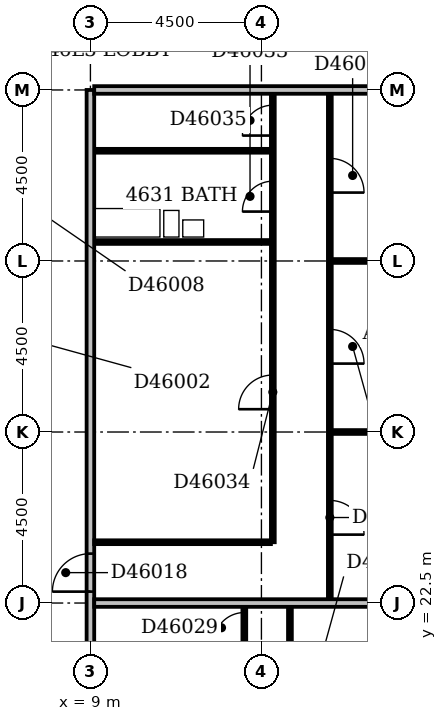
"""IFC4 building model, lengths in metres.
Left out: names, types, materials, properties, quantities, classifications, styles, units other than length and angle.
Written with IfcOpenShell. Run it as: python <this file> out.ifc"""

import sys

from ifc_helpers import new_model, si_unit, direction, frame, frame_2d, origin, place, context, subcontext, project, spatial, rectangle, extrude, element, fill, save


model = new_model("IFC4")
c1 = context("Model", 3, precision=1e-05, world=origin(), true_north=direction((0.0, 1.0)))
c2 = subcontext(c1, "Body", "Model", "MODEL_VIEW")
j1 = project(units=[si_unit("LENGTHUNIT", "METRE"), si_unit("PLANEANGLEUNIT", "RADIAN")], contexts=[c1])
p1 = place(None, origin())
s1 = spatial("IfcSite", under=j1, at=p1, CompositionType="ELEMENT")
p2 = place(p1, origin())
s2 = spatial("IfcBuilding", under=s1, at=p2, CompositionType="ELEMENT")
p3 = place(p2, frame((0.0, 0.0, 182.6)))
s3 = spatial("IfcBuildingStorey", under=s2, at=p3, CompositionType="ELEMENT", Elevation=182.6)
p4 = place(p3, frame((9.0, 5.0, 0.0), z_axis=(0.0, 0.0, 1.0), x_axis=(0.0, 1.0, 0.0)))
e1 = element("IfcWall", 1, at=p4, inside=s3, PredefinedType="PARTITIONING", context=c2, shape_type="SweptSolid", body=[
    extrude(rectangle(XDim=31.0, YDim=0.2, at=frame_2d((15.5, 0.0))), origin(), (0.0, 0.0, 1.0), 3.25),
])
p5 = place(p4, frame((17.8, 0.0, 0.0)))
e2 = element("IfcOpeningElement", 2, at=p5, cuts=e1, PredefinedType="OPENING", context=c2, shape_type="SweptSolid", body=[
    extrude(rectangle(XDim=1.0, YDim=2.1, at=frame_2d((0.5, 1.05))), frame((0.0, 0.112, 0.0), z_axis=(0.0, -1.0, 0.0), x_axis=(1.0, 0.0, 0.0)), (0.0, 0.0, 1.0), 0.224),
])
p6 = place(p4, frame((14.95, 0.0, 0.0)))
e3 = element("IfcOpeningElement", 3, at=p6, cuts=e1, PredefinedType="OPENING", context=c2, shape_type="SweptSolid", body=[
    extrude(rectangle(XDim=1.0, YDim=2.1, at=frame_2d((0.5, 1.05))), frame((0.0, 0.112, 0.0), z_axis=(0.0, -1.0, 0.0), x_axis=(1.0, 0.0, 0.0)), (0.0, 0.0, 1.0), 0.224),
])
p7 = place(p4, frame((9.3, 0.0, 0.0)))
e4 = element("IfcOpeningElement", 4, at=p7, cuts=e1, PredefinedType="OPENING", context=c2, shape_type="SweptSolid", body=[
    extrude(rectangle(XDim=1.0, YDim=2.1, at=frame_2d((0.5, 1.05))), frame((0.0, 0.112, 0.0), z_axis=(0.0, -1.0, 0.0), x_axis=(1.0, 0.0, 0.0)), (0.0, 0.0, 1.0), 0.224),
])
p8 = place(p4, frame((1.5, 0.0, 0.0)))
e5 = element("IfcOpeningElement", 5, at=p8, cuts=e1, PredefinedType="OPENING", context=c2, shape_type="SweptSolid", body=[
    extrude(rectangle(XDim=0.9, YDim=2.1, at=frame_2d((0.45, 1.05))), frame((0.0, 0.112, 0.0), z_axis=(0.0, -1.0, 0.0), x_axis=(1.0, 0.0, 0.0)), (0.0, 0.0, 1.0), 0.224),
])
p9 = place(p3, frame((14.25, 18.1, 0.0), z_axis=(0.0, 0.0, 1.0), x_axis=(0.0, 1.0, 0.0)))
e6 = element("IfcWall", 6, at=p9, inside=s3, PredefinedType="PARTITIONING", context=c2, shape_type="SweptSolid", body=[
    extrude(rectangle(XDim=4.3, YDim=0.1, at=frame_2d((2.15, 0.0))), origin(), (0.0, 0.0, 1.0), 3.25),
])
p10 = place(p9, frame((1.7, 0.0, 0.0)))
e7 = element("IfcOpeningElement", 7, at=p10, cuts=e6, PredefinedType="OPENING", context=c2, shape_type="SweptSolid", body=[
    extrude(rectangle(XDim=0.9, YDim=2.1, at=frame_2d((0.45, 1.05))), frame((0.0, 0.062, 0.0), z_axis=(0.0, -1.0, 0.0), x_axis=(1.0, 0.0, 0.0)), (0.0, 0.0, 1.0), 0.124),
])
p11 = place(p3, frame((13.05, 21.2, 0.0), z_axis=(0.0, 0.0, 1.0), x_axis=(0.0, 1.0, 0.0)))
e8 = element("IfcWall", 8, at=p11, inside=s3, PredefinedType="PARTITIONING", context=c2, shape_type="SweptSolid", body=[
    extrude(rectangle(XDim=1.2, YDim=0.1, at=frame_2d((0.6, 0.0))), origin(), (0.0, 0.0, 1.0), 3.25),
])
p12 = place(p11, frame((0.25, 0.0, 0.0)))
e9 = element("IfcOpeningElement", 9, at=p12, cuts=e8, PredefinedType="OPENING", context=c2, shape_type="SweptSolid", body=[
    extrude(rectangle(XDim=0.8, YDim=2.1, at=frame_2d((0.4, 1.05))), frame((0.0, 0.062, 0.0), z_axis=(0.0, -1.0, 0.0), x_axis=(1.0, 0.0, 0.0)), (0.0, 0.0, 1.0), 0.124),
])
p13 = place(p3, frame((9.1, 22.5, 0.0), z_axis=(0.0, 0.0, 1.0), x_axis=(1.0, 0.0, 0.0)))
e10 = element("IfcWall", 10, at=p13, inside=s3, PredefinedType="PARTITIONING", context=c2, shape_type="SweptSolid", body=[
    extrude(rectangle(XDim=12.95, YDim=0.2, at=frame_2d((6.475, 0.0))), origin(), (0.0, 0.0, 1.0), 3.25),
])
p14 = place(p3, frame((15.3, 22.6, 0.0), z_axis=(0.0, 0.0, 1.0), x_axis=(0.0, 1.0, 0.0)))
e11 = element("IfcWall", 11, at=p14, inside=s3, PredefinedType="PARTITIONING", context=c2, shape_type="SweptSolid", body=[
    extrude(rectangle(XDim=13.3, YDim=0.1, at=frame_2d((6.65, 0.0))), origin(), (0.0, 0.0, 1.0), 3.25),
])
p15 = place(p14, frame((1.7, 0.0, 0.0)))
e12 = element("IfcOpeningElement", 12, at=p15, cuts=e11, PredefinedType="OPENING", context=c2, shape_type="SweptSolid", body=[
    extrude(rectangle(XDim=0.9, YDim=2.1, at=frame_2d((0.45, 1.05))), frame((0.0, 0.062, 0.0), z_axis=(0.0, -1.0, 0.0), x_axis=(1.0, 0.0, 0.0)), (0.0, 0.0, 1.0), 0.124),
])
p16 = place(p14, frame((6.2, 0.0, 0.0)))
e13 = element("IfcOpeningElement", 13, at=p16, cuts=e11, PredefinedType="OPENING", context=c2, shape_type="SweptSolid", body=[
    extrude(rectangle(XDim=0.9, YDim=2.1, at=frame_2d((0.45, 1.05))), frame((0.0, 0.062, 0.0), z_axis=(0.0, -1.0, 0.0), x_axis=(1.0, 0.0, 0.0)), (0.0, 0.0, 1.0), 0.124),
])
p17 = place(p14, frame((10.7, 0.0, 0.0)))
e14 = element("IfcOpeningElement", 14, at=p17, cuts=e11, PredefinedType="OPENING", context=c2, shape_type="SweptSolid", body=[
    extrude(rectangle(XDim=0.9, YDim=2.1, at=frame_2d((0.45, 1.05))), frame((0.0, 0.062, 0.0), z_axis=(0.0, -1.0, 0.0), x_axis=(1.0, 0.0, 0.0)), (0.0, 0.0, 1.0), 0.124),
])
p18 = place(p3, frame((9.1, 24.1, 0.0), z_axis=(0.0, 0.0, 1.0), x_axis=(1.0, 0.0, 0.0)))
e15 = element("IfcWall", 15, at=p18, inside=s3, PredefinedType="PARTITIONING", context=c2, shape_type="SweptSolid", body=[
    extrude(rectangle(XDim=4.65, YDim=0.1, at=frame_2d((2.325, 0.0))), origin(), (0.0, 0.0, 1.0), 3.25),
])
p19 = place(p3, frame((13.8, 24.1, 0.0), z_axis=(0.0, 0.0, 1.0), x_axis=(0.0, 1.0, 0.0)))
e16 = element("IfcWall", 16, at=p19, inside=s3, PredefinedType="PARTITIONING", context=c2, shape_type="SweptSolid", body=[
    extrude(rectangle(XDim=11.8, YDim=0.1, at=frame_2d((5.9, 0.0))), origin(), (0.0, 0.0, 1.0), 3.25),
])
p20 = place(p19, frame((8.7, 0.0, 0.0)))
e17 = element("IfcOpeningElement", 17, at=p20, cuts=e16, PredefinedType="OPENING", context=c2, shape_type="SweptSolid", body=[
    extrude(rectangle(XDim=0.8, YDim=2.1, at=frame_2d((0.4, 1.05))), frame((0.0, 0.062, 0.0), z_axis=(0.0, -1.0, 0.0), x_axis=(1.0, 0.0, 0.0)), (0.0, 0.0, 1.0), 0.124),
])
p21 = place(p19, frame((3.5, 0.0, 0.0)))
e18 = element("IfcOpeningElement", 18, at=p21, cuts=e16, PredefinedType="OPENING", context=c2, shape_type="SweptSolid", body=[
    extrude(rectangle(XDim=0.9, YDim=2.1, at=frame_2d((0.45, 1.05))), frame((0.0, 0.062, 0.0), z_axis=(0.0, -1.0, 0.0), x_axis=(1.0, 0.0, 0.0)), (0.0, 0.0, 1.0), 0.124),
])
p22 = place(p19, frame((10.7, 0.0, 0.0)))
e19 = element("IfcOpeningElement", 19, at=p22, cuts=e16, PredefinedType="OPENING", context=c2, shape_type="SweptSolid", body=[
    extrude(rectangle(XDim=0.8, YDim=2.1, at=frame_2d((0.4, 1.05))), frame((0.0, 0.062, 0.0), z_axis=(0.0, -1.0, 0.0), x_axis=(1.0, 0.0, 0.0)), (0.0, 0.0, 1.0), 0.124),
])
p23 = place(p3, frame((15.35, 27.0, 0.0), z_axis=(0.0, 0.0, 1.0), x_axis=(1.0, 0.0, 0.0)))
e20 = element("IfcWall", 20, at=p23, inside=s3, PredefinedType="PARTITIONING", context=c2, shape_type="SweptSolid", body=[
    extrude(rectangle(XDim=6.7, YDim=0.1, at=frame_2d((3.35, 0.0))), origin(), (0.0, 0.0, 1.0), 2.65),
])
p24 = place(p3, frame((15.35, 31.5, 0.0), z_axis=(0.0, 0.0, 1.0), x_axis=(1.0, 0.0, 0.0)))
e21 = element("IfcWall", 21, at=p24, inside=s3, PredefinedType="PARTITIONING", context=c2, shape_type="SweptSolid", body=[
    extrude(rectangle(XDim=6.7, YDim=0.1, at=frame_2d((3.35, 0.0))), origin(), (0.0, 0.0, 1.0), 3.25),
])
for number, where, z_axis, x_axis in (
    (22, (9.1, 32.0, 0.0), (0.0, 0.0, 1.0), (1.0, 0.0, 0.0)),
    (23, (9.1, 34.4, 0.0), (0.0, 0.0, 1.0), (1.0, 0.0, 0.0)),
):
    element("IfcWall", number, at=place(p3, frame(where, z_axis=z_axis, x_axis=x_axis)), inside=s3, PredefinedType="PLUMBINGWALL", context=c2, shape_type="SweptSolid", body=[
        extrude(rectangle(XDim=4.65, YDim=0.1, at=frame_2d((2.325, 0.0))), origin(), (0.0, 0.0, 1.0), 3.25),
    ])
p25 = place(p3, frame((9.1, 36.0, 0.0), z_axis=(0.0, 0.0, 1.0), x_axis=(1.0, 0.0, 0.0)))
e24 = element("IfcWall", 24, at=p25, inside=s3, PredefinedType="PARTITIONING", context=c2, shape_type="SweptSolid", body=[
    extrude(rectangle(XDim=12.95, YDim=0.2, at=frame_2d((6.475, 0.0))), origin(), (0.0, 0.0, 1.0), 3.25),
])
p26 = place(p5, origin())
e25 = element("IfcDoor", 25, at=p26, inside=s3, OperationType="SINGLE_SWING_LEFT", PredefinedType="DOOR", context=c2, shape_type="SweptSolid", body=[
    extrude(rectangle(XDim=1.0, YDim=2.1, at=frame_2d((0.5, 1.05))), frame((0.0, 0.025, 0.0), z_axis=(0.0, -1.0, 0.0), x_axis=(1.0, 0.0, 0.0)), (0.0, 0.0, 1.0), 0.05),
])
fill(e2, e25)
p27 = place(p12, origin())
e26 = element("IfcDoor", 26, at=p27, inside=s3, OperationType="SINGLE_SWING_LEFT", PredefinedType="DOOR", context=c2, shape_type="SweptSolid", body=[
    extrude(rectangle(XDim=0.8, YDim=2.1, at=frame_2d((0.4, 1.05))), frame((0.0, 0.025, 0.0), z_axis=(0.0, -1.0, 0.0), x_axis=(1.0, 0.0, 0.0)), (0.0, 0.0, 1.0), 0.05),
])
fill(e9, e26)
p28 = place(p15, frame((0.9, 0.0, 0.0), z_axis=(0.0, 0.0, 1.0), x_axis=(-1.0, 0.0, 0.0)))
e27 = element("IfcDoor", 27, at=p28, inside=s3, OperationType="SINGLE_SWING_RIGHT", PredefinedType="DOOR", context=c2, shape_type="SweptSolid", body=[
    extrude(rectangle(XDim=0.9, YDim=2.1, at=frame_2d((0.45, 1.05))), frame((0.0, 0.025, 0.0), z_axis=(0.0, -1.0, 0.0), x_axis=(1.0, 0.0, 0.0)), (0.0, 0.0, 1.0), 0.05),
])
fill(e12, e27)
p29 = place(p16, frame((0.9, 0.0, 0.0), z_axis=(0.0, 0.0, 1.0), x_axis=(-1.0, 0.0, 0.0)))
e28 = element("IfcDoor", 28, at=p29, inside=s3, OperationType="SINGLE_SWING_RIGHT", PredefinedType="DOOR", context=c2, shape_type="SweptSolid", body=[
    extrude(rectangle(XDim=0.9, YDim=2.1, at=frame_2d((0.45, 1.05))), frame((0.0, 0.025, 0.0), z_axis=(0.0, -1.0, 0.0), x_axis=(1.0, 0.0, 0.0)), (0.0, 0.0, 1.0), 0.05),
])
fill(e13, e28)
p30 = place(p17, frame((0.9, 0.0, 0.0), z_axis=(0.0, 0.0, 1.0), x_axis=(-1.0, 0.0, 0.0)))
e29 = element("IfcDoor", 29, at=p30, inside=s3, OperationType="SINGLE_SWING_RIGHT", PredefinedType="DOOR", context=c2, shape_type="SweptSolid", body=[
    extrude(rectangle(XDim=0.9, YDim=2.1, at=frame_2d((0.45, 1.05))), frame((0.0, 0.025, 0.0), z_axis=(0.0, -1.0, 0.0), x_axis=(1.0, 0.0, 0.0)), (0.0, 0.0, 1.0), 0.05),
])
fill(e14, e29)
p31 = place(p20, origin())
e30 = element("IfcDoor", 30, at=p31, inside=s3, OperationType="SINGLE_SWING_LEFT", PredefinedType="DOOR", context=c2, shape_type="SweptSolid", body=[
    extrude(rectangle(XDim=0.8, YDim=2.1, at=frame_2d((0.4, 1.05))), frame((0.0, 0.025, 0.0), z_axis=(0.0, -1.0, 0.0), x_axis=(1.0, 0.0, 0.0)), (0.0, 0.0, 1.0), 0.05),
])
fill(e17, e30)
p32 = place(p21, origin())
e31 = element("IfcDoor", 31, at=p32, inside=s3, OperationType="SINGLE_SWING_LEFT", PredefinedType="DOOR", context=c2, shape_type="SweptSolid", body=[
    extrude(rectangle(XDim=0.9, YDim=2.1, at=frame_2d((0.45, 1.05))), frame((0.0, 0.025, 0.0), z_axis=(0.0, -1.0, 0.0), x_axis=(1.0, 0.0, 0.0)), (0.0, 0.0, 1.0), 0.05),
])
fill(e18, e31)
p33 = place(p22, origin())
e32 = element("IfcDoor", 32, at=p33, inside=s3, OperationType="SINGLE_SWING_LEFT", PredefinedType="DOOR", context=c2, shape_type="SweptSolid", body=[
    extrude(rectangle(XDim=0.8, YDim=2.1, at=frame_2d((0.4, 1.05))), frame((0.0, 0.025, 0.0), z_axis=(0.0, -1.0, 0.0), x_axis=(1.0, 0.0, 0.0)), (0.0, 0.0, 1.0), 0.05),
])
fill(e19, e32)
save(model, sys.argv[1])
